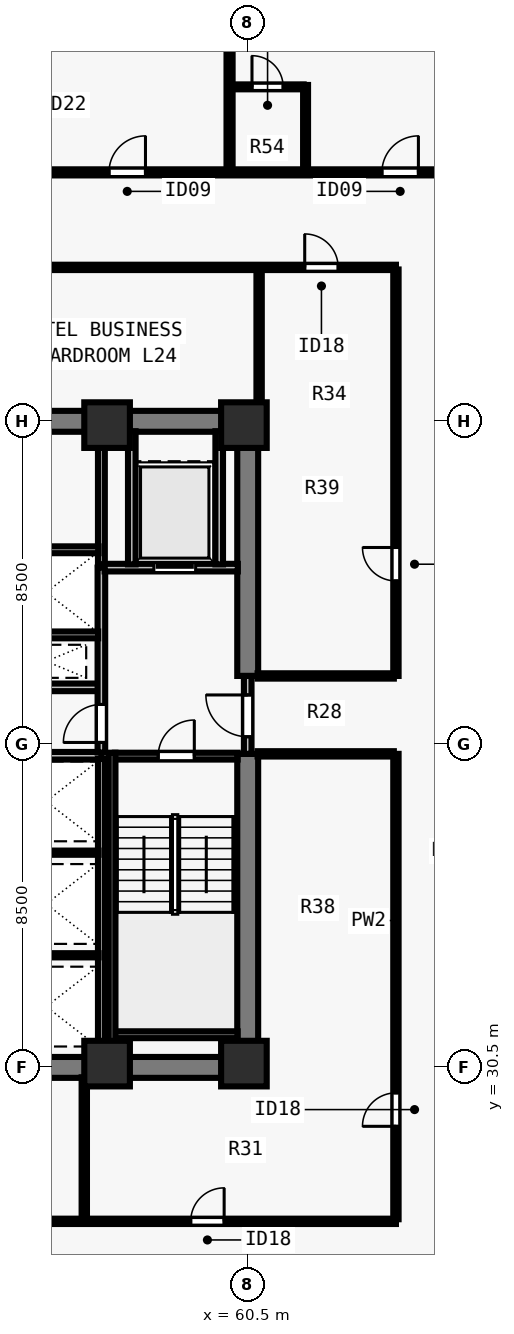
"""IFC4 building model, lengths in metres.
Left out: names, types, materials, properties, quantities, classifications, styles, units other than length and angle.
Written with IfcOpenShell. Run it as: python <this file> out.ifc"""

import sys

from ifc_helpers import new_model, si_unit, direction, frame, frame_2d, origin, origin_2d, place, context, subcontext, project, spatial, rectangle, extrude, element, fill, save


model = new_model("IFC4")
c1 = context("Model", 3, precision=1e-05, world=origin(), true_north=direction((0.0, 1.0)))
c2 = subcontext(c1, "Body", "Model", "MODEL_VIEW")
j1 = project(units=[si_unit("LENGTHUNIT", "METRE"), si_unit("PLANEANGLEUNIT", "RADIAN")], contexts=[c1])
p1 = place(None, origin())
s1 = spatial("IfcSite", under=j1, at=p1, CompositionType="ELEMENT")
p2 = place(p1, origin())
s2 = spatial("IfcBuilding", under=s1, at=p2, CompositionType="ELEMENT")
p3 = place(p2, frame((0.0, 0.0, 90.0)))
s3 = spatial("IfcBuildingStorey", under=s2, at=p3, CompositionType="ELEMENT", Elevation=90.0)
for number, where, z_axis, x_axis in (
    (1, (56.8, 30.6, 0.0), (0.0, 0.0, 1.0), (1.0, 0.0, 0.0)),
    (2, (60.4, 30.6, 0.0), (0.0, 0.0, 1.0), (1.0, 0.0, 0.0)),
    (3, (56.8, 47.4, 0.0), (0.0, 0.0, 1.0), (1.0, 0.0, 0.0)),
    (4, (60.4, 47.4, 0.0), (0.0, 0.0, 1.0), (1.0, 0.0, 0.0)),
):
    element("IfcColumn", number, at=place(p3, frame(where, z_axis=z_axis, x_axis=x_axis)), inside=s3, PredefinedType="COLUMN", context=c2, shape_type="SweptSolid", body=[
        extrude(rectangle(XDim=1.2, YDim=1.2, at=origin_2d()), origin(), (0.0, 0.0, 1.0), 3.5),
    ])
for number, where, z_axis, x_axis in (
    (5, (43.225, 30.5, 0.0), (0.0, 0.0, 1.0), (1.0, 0.0, 0.0)),
    (6, (43.225, 47.5, 0.0), (0.0, 0.0, 1.0), (1.0, 0.0, 0.0)),
):
    element("IfcWall", number, at=place(p3, frame(where, z_axis=z_axis, x_axis=x_axis)), inside=s3, PredefinedType="SHEAR", context=c2, shape_type="SweptSolid", body=[
        extrude(rectangle(XDim=17.55, YDim=0.55, at=frame_2d((8.775, 0.0))), origin(), (0.0, 0.0, 1.0), 3.28),
    ])
p4 = place(p3, frame((60.5, 30.765, 0.0), z_axis=(0.0, 0.0, 1.0), x_axis=(0.0, 1.0, 0.0)))
e7 = element("IfcWall", 7, at=p4, inside=s3, PredefinedType="SHEAR", context=c2, shape_type="SweptSolid", body=[
    extrude(rectangle(XDim=7.985, YDim=0.55, at=frame_2d((3.993, 0.0))), origin(), (0.0, 0.0, 1.0), 3.28),
])
p5 = place(p3, frame((60.5, 40.8, 0.0), z_axis=(0.0, 0.0, 1.0), x_axis=(0.0, 1.0, 0.0)))
e8 = element("IfcWall", 8, at=p5, inside=s3, PredefinedType="SHEAR", context=c2, shape_type="SweptSolid", body=[
    extrude(rectangle(XDim=6.435, YDim=0.55, at=frame_2d((3.218, 0.0))), origin(), (0.0, 0.0, 1.0), 3.28),
])
for number, where, z_axis, x_axis in (
    (9, (53.7, 38.7, 0.0), (0.0, 0.0, 1.0), (1.0, 0.0, 0.0)),
    (10, (53.7, 40.5, 0.0), (0.0, 0.0, 1.0), (1.0, 0.0, 0.0)),
):
    element("IfcWall", number, at=place(p3, frame(where, z_axis=z_axis, x_axis=x_axis)), inside=s3, PredefinedType="SOLIDWALL", context=c2, shape_type="SweptSolid", body=[
        extrude(rectangle(XDim=2.95, YDim=0.2, at=frame_2d((1.475, 0.0))), origin(), (0.0, 0.0, 1.0), 3.28),
    ])
p6 = place(p3, frame((60.5, 38.75, 0.0), z_axis=(0.0, 0.0, 1.0), x_axis=(0.0, 1.0, 0.0)))
e11 = element("IfcWall", 11, at=p6, inside=s3, PredefinedType="SOLIDWALL", context=c2, shape_type="SweptSolid", body=[
    extrude(rectangle(XDim=2.05, YDim=0.2, at=frame_2d((1.025, 0.0))), origin(), (0.0, 0.0, 1.0), 3.28),
])
p7 = place(p6, frame((0.45, 0.0, 0.0)))
e12 = element("IfcOpeningElement", 12, at=p7, cuts=e11, PredefinedType="OPENING", context=c2, shape_type="SweptSolid", body=[
    extrude(rectangle(XDim=1.1, YDim=2.15, at=frame_2d((0.55, 1.075))), frame((0.0, 0.11, 0.0), z_axis=(0.0, -1.0, 0.0), x_axis=(1.0, 0.0, 0.0)), (0.0, 0.0, 1.0), 0.22),
])
p8 = place(p3, frame((56.65, 38.785, 0.0), z_axis=(0.0, 0.0, 1.0), x_axis=(0.0, 1.0, 0.0)))
e13 = element("IfcWall", 13, at=p8, inside=s3, PredefinedType="SOLIDWALL", context=c2, shape_type="SweptSolid", body=[
    extrude(rectangle(XDim=4.865, YDim=0.2, at=frame_2d((2.433, 0.0))), origin(), (0.0, 0.0, 1.0), 3.28),
])
p9 = place(p8, frame((0.265, 0.0, 0.0)))
e14 = element("IfcOpeningElement", 14, at=p9, cuts=e13, PredefinedType="OPENING", context=c2, shape_type="SweptSolid", body=[
    extrude(rectangle(XDim=1.0, YDim=2.15, at=frame_2d((0.5, 1.075))), frame((0.0, 0.11, 0.0), z_axis=(0.0, -1.0, 0.0), x_axis=(1.0, 0.0, 0.0)), (0.0, 0.0, 1.0), 0.22),
])
p10 = place(p3, frame((56.735, 43.65, 0.0), z_axis=(0.0, 0.0, 1.0), x_axis=(1.0, 0.0, 0.0)))
e15 = element("IfcWall", 15, at=p10, inside=s3, PredefinedType="SOLIDWALL", context=c2, shape_type="SweptSolid", body=[
    extrude(rectangle(XDim=3.505, YDim=0.2, at=frame_2d((1.752, 0.0))), origin(), (0.0, 0.0, 1.0), 3.28),
])
p11 = place(p10, frame((1.295, 0.0, 0.0)))
e16 = element("IfcOpeningElement", 16, at=p11, cuts=e15, PredefinedType="OPENING", context=c2, shape_type="SweptSolid", body=[
    extrude(rectangle(XDim=1.1, YDim=2.2, at=frame_2d((0.55, 1.1))), frame((0.0, 0.11, 0.0), z_axis=(0.0, -1.0, 0.0), x_axis=(1.0, 0.0, 0.0)), (0.0, 0.0, 1.0), 0.22),
])
for number, where, z_axis, x_axis in (
    (17, (57.45, 43.735, 0.0), (0.0, 0.0, 1.0), (0.0, 1.0, 0.0)),
    (18, (59.75, 43.735, 0.0), (0.0, 0.0, 1.0), (0.0, 1.0, 0.0)),
):
    element("IfcWall", number, at=place(p3, frame(where, z_axis=z_axis, x_axis=x_axis)), inside=s3, PredefinedType="SOLIDWALL", context=c2, shape_type="SweptSolid", body=[
        extrude(rectangle(XDim=3.505, YDim=0.2, at=frame_2d((1.752, 0.0))), origin(), (0.0, 0.0, 1.0), 3.28),
    ])
p12 = place(p3, frame((56.65, 30.76, 0.0), z_axis=(0.0, 0.0, 1.0), x_axis=(0.0, 1.0, 0.0)))
e19 = element("IfcWall", 19, at=p12, inside=s3, PredefinedType="SOLIDWALL", context=c2, shape_type="SweptSolid", body=[
    extrude(rectangle(XDim=7.855, YDim=0.18, at=frame_2d((3.927, 0.0))), origin(), (0.0, 0.0, 1.0), 3.28),
])
for number, where, z_axis, x_axis in (
    (20, (53.785, 33.45, 0.0), (0.0, 0.0, 1.0), (1.0, 0.0, 0.0)),
    (21, (53.785, 36.15, 0.0), (0.0, 0.0, 1.0), (1.0, 0.0, 0.0)),
):
    element("IfcWall", number, at=place(p3, frame(where, z_axis=z_axis, x_axis=x_axis)), inside=s3, PredefinedType="PARTITIONING", context=c2, shape_type="SweptSolid", body=[
        extrude(rectangle(XDim=2.79, YDim=0.11, at=frame_2d((1.395, 0.0))), origin(), (0.0, 0.0, 1.0), 3.28),
    ])
p13 = place(p3, frame((56.65, 43.735, 0.0), z_axis=(0.0, 0.0, 1.0), x_axis=(0.0, 1.0, 0.0)))
e22 = element("IfcWall", 22, at=p13, inside=s3, PredefinedType="SOLIDWALL", context=c2, shape_type="SweptSolid", body=[
    extrude(rectangle(XDim=3.505, YDim=0.18, at=frame_2d((1.752, 0.0))), origin(), (0.0, 0.0, 1.0), 3.28),
])
p14 = place(p3, frame((53.785, 41.88, 0.0), z_axis=(0.0, 0.0, 1.0), x_axis=(1.0, 0.0, 0.0)))
e23 = element("IfcWall", 23, at=p14, inside=s3, PredefinedType="SOLIDWALL", context=c2, shape_type="SweptSolid", body=[
    extrude(rectangle(XDim=2.78, YDim=0.18, at=frame_2d((1.39, 0.0))), origin(), (0.0, 0.0, 1.0), 3.28),
])
p15 = place(p3, frame((53.785, 44.12, 0.0), z_axis=(0.0, 0.0, 1.0), x_axis=(1.0, 0.0, 0.0)))
e24 = element("IfcWall", 24, at=p15, inside=s3, PredefinedType="SOLIDWALL", context=c2, shape_type="SweptSolid", body=[
    extrude(rectangle(XDim=2.79, YDim=0.18, at=frame_2d((1.395, 0.0))), origin(), (0.0, 0.0, 1.0), 3.28),
])
p16 = place(p3, frame((37.1, 54.05, 0.0), z_axis=(0.0, 0.0, 1.0), x_axis=(1.0, 0.0, 0.0)))
e25 = element("IfcWall", 25, at=p16, inside=s3, PredefinedType="PARTITIONING", context=c2, shape_type="SweptSolid", body=[
    extrude(rectangle(XDim=29.8, YDim=0.16, at=frame_2d((14.9, 0.0))), origin(), (0.0, 0.0, 1.0), 3.28),
])
p17 = place(p16, frame((0.91, 0.0, 0.0)))
e26 = element("IfcOpeningElement", 26, at=p17, cuts=e25, PredefinedType="OPENING", context=c2, shape_type="SweptSolid", body=[
    extrude(rectangle(XDim=0.96, YDim=2.15, at=frame_2d((0.48, 1.075))), frame((0.0, 0.09, 0.0), z_axis=(0.0, -1.0, 0.0), x_axis=(1.0, 0.0, 0.0)), (0.0, 0.0, 1.0), 0.18),
])
p18 = place(p16, frame((3.03, 0.0, 0.0)))
e27 = element("IfcOpeningElement", 27, at=p18, cuts=e25, PredefinedType="OPENING", context=c2, shape_type="SweptSolid", body=[
    extrude(rectangle(XDim=0.96, YDim=2.15, at=frame_2d((0.48, 1.075))), frame((0.0, 0.09, 0.0), z_axis=(0.0, -1.0, 0.0), x_axis=(1.0, 0.0, 0.0)), (0.0, 0.0, 1.0), 0.18),
])
p19 = place(p16, frame((11.39, 0.0, 0.0)))
e28 = element("IfcOpeningElement", 28, at=p19, cuts=e25, PredefinedType="OPENING", context=c2, shape_type="SweptSolid", body=[
    extrude(rectangle(XDim=0.96, YDim=2.15, at=frame_2d((0.48, 1.075))), frame((0.0, 0.09, 0.0), z_axis=(0.0, -1.0, 0.0), x_axis=(1.0, 0.0, 0.0)), (0.0, 0.0, 1.0), 0.18),
])
p20 = place(p16, frame((19.75, 0.0, 0.0)))
e29 = element("IfcOpeningElement", 29, at=p20, cuts=e25, PredefinedType="OPENING", context=c2, shape_type="SweptSolid", body=[
    extrude(rectangle(XDim=0.96, YDim=2.15, at=frame_2d((0.48, 1.075))), frame((0.0, 0.09, 0.0), z_axis=(0.0, -1.0, 0.0), x_axis=(1.0, 0.0, 0.0)), (0.0, 0.0, 1.0), 0.18),
])
p21 = place(p16, frame((26.931, 0.0, 0.0)))
e30 = element("IfcOpeningElement", 30, at=p21, cuts=e25, PredefinedType="OPENING", context=c2, shape_type="SweptSolid", body=[
    extrude(rectangle(XDim=0.96, YDim=2.15, at=frame_2d((0.48, 1.075))), frame((0.0, 0.09, 0.0), z_axis=(0.0, -1.0, 0.0), x_axis=(1.0, 0.0, 0.0)), (0.0, 0.0, 1.0), 0.18),
])
p22 = place(p16, frame((28.48, 0.0, 0.0)))
e31 = element("IfcOpeningElement", 31, at=p22, cuts=e25, PredefinedType="OPENING", context=c2, shape_type="SweptSolid", body=[
    extrude(rectangle(XDim=0.96, YDim=2.15, at=frame_2d((0.48, 1.075))), frame((0.0, 0.09, 0.0), z_axis=(0.0, -1.0, 0.0), x_axis=(1.0, 0.0, 0.0)), (0.0, 0.0, 1.0), 0.18),
])
p23 = place(p3, frame((39.6, 26.45, 0.0), z_axis=(0.0, 0.0, 1.0), x_axis=(1.0, 0.0, 0.0)))
e32 = element("IfcWall", 32, at=p23, inside=s3, PredefinedType="PARTITIONING", context=c2, shape_type="SweptSolid", body=[
    extrude(rectangle(XDim=24.8, YDim=0.14, at=frame_2d((12.4, 0.0))), origin(), (0.0, 0.0, 1.0), 3.28),
])
p24 = place(p23, frame((1.2, 0.0, 0.0)))
e33 = element("IfcOpeningElement", 33, at=p24, cuts=e32, PredefinedType="OPENING", context=c2, shape_type="SweptSolid", body=[
    extrude(rectangle(XDim=0.88, YDim=2.1, at=frame_2d((0.44, 1.05))), frame((0.0, 0.08, 0.0), z_axis=(0.0, -1.0, 0.0), x_axis=(1.0, 0.0, 0.0)), (0.0, 0.0, 1.0), 0.16),
])
p25 = place(p23, frame((8.9, 0.0, 0.0)))
e34 = element("IfcOpeningElement", 34, at=p25, cuts=e32, PredefinedType="OPENING", context=c2, shape_type="SweptSolid", body=[
    extrude(rectangle(XDim=0.88, YDim=2.1, at=frame_2d((0.44, 1.05))), frame((0.0, 0.08, 0.0), z_axis=(0.0, -1.0, 0.0), x_axis=(1.0, 0.0, 0.0)), (0.0, 0.0, 1.0), 0.16),
])
p26 = place(p23, frame((19.4, 0.0, 0.0)))
e35 = element("IfcOpeningElement", 35, at=p26, cuts=e32, PredefinedType="OPENING", context=c2, shape_type="SweptSolid", body=[
    extrude(rectangle(XDim=0.88, YDim=2.1, at=frame_2d((0.44, 1.05))), frame((0.0, 0.08, 0.0), z_axis=(0.0, -1.0, 0.0), x_axis=(1.0, 0.0, 0.0)), (0.0, 0.0, 1.0), 0.16),
])
p27 = place(p3, frame((39.6, 51.55, 0.0), z_axis=(0.0, 0.0, 1.0), x_axis=(1.0, 0.0, 0.0)))
e36 = element("IfcWall", 36, at=p27, inside=s3, PredefinedType="PARTITIONING", context=c2, shape_type="SweptSolid", body=[
    extrude(rectangle(XDim=24.8, YDim=0.14, at=frame_2d((12.4, 0.0))), origin(), (0.0, 0.0, 1.0), 3.28),
])
p28 = place(p27, frame((2.2, 0.0, 0.0)))
e37 = element("IfcOpeningElement", 37, at=p28, cuts=e36, PredefinedType="OPENING", context=c2, shape_type="SweptSolid", body=[
    extrude(rectangle(XDim=0.88, YDim=2.1, at=frame_2d((0.44, 1.05))), frame((0.0, 0.08, 0.0), z_axis=(0.0, -1.0, 0.0), x_axis=(1.0, 0.0, 0.0)), (0.0, 0.0, 1.0), 0.16),
])
p29 = place(p27, frame((12.9, 0.0, 0.0)))
e38 = element("IfcOpeningElement", 38, at=p29, cuts=e36, PredefinedType="OPENING", context=c2, shape_type="SweptSolid", body=[
    extrude(rectangle(XDim=0.88, YDim=2.1, at=frame_2d((0.44, 1.05))), frame((0.0, 0.08, 0.0), z_axis=(0.0, -1.0, 0.0), x_axis=(1.0, 0.0, 0.0)), (0.0, 0.0, 1.0), 0.16),
])
p30 = place(p27, frame((22.4, 0.0, 0.0)))
e39 = element("IfcOpeningElement", 39, at=p30, cuts=e36, PredefinedType="OPENING", context=c2, shape_type="SweptSolid", body=[
    extrude(rectangle(XDim=0.88, YDim=2.1, at=frame_2d((0.44, 1.05))), frame((0.0, 0.08, 0.0), z_axis=(0.0, -1.0, 0.0), x_axis=(1.0, 0.0, 0.0)), (0.0, 0.0, 1.0), 0.16),
])
p31 = place(p3, frame((64.4, 26.505, 0.0), z_axis=(0.0, 0.0, 1.0), x_axis=(0.0, 1.0, 0.0)))
e40 = element("IfcWall", 40, at=p31, inside=s3, PredefinedType="PARTITIONING", context=c2, shape_type="SweptSolid", body=[
    extrude(rectangle(XDim=12.245, YDim=0.14, at=frame_2d((6.123, 0.0))), origin(), (0.0, 0.0, 1.0), 3.28),
])
p32 = place(p31, frame((2.445, 0.0, 0.0)))
e41 = element("IfcOpeningElement", 41, at=p32, cuts=e40, PredefinedType="OPENING", context=c2, shape_type="SweptSolid", body=[
    extrude(rectangle(XDim=0.88, YDim=2.1, at=frame_2d((0.44, 1.05))), frame((0.0, 0.08, 0.0), z_axis=(0.0, -1.0, 0.0), x_axis=(1.0, 0.0, 0.0)), (0.0, 0.0, 1.0), 0.16),
])
p33 = place(p3, frame((64.4, 40.8, 0.0), z_axis=(0.0, 0.0, 1.0), x_axis=(0.0, 1.0, 0.0)))
e42 = element("IfcWall", 42, at=p33, inside=s3, PredefinedType="PARTITIONING", context=c2, shape_type="SweptSolid", body=[
    extrude(rectangle(XDim=10.695, YDim=0.14, at=frame_2d((5.348, 0.0))), origin(), (0.0, 0.0, 1.0), 3.28),
])
p34 = place(p33, frame((2.5, 0.0, 0.0)))
e43 = element("IfcOpeningElement", 43, at=p34, cuts=e42, PredefinedType="OPENING", context=c2, shape_type="SweptSolid", body=[
    extrude(rectangle(XDim=0.88, YDim=2.1, at=frame_2d((0.44, 1.05))), frame((0.0, 0.08, 0.0), z_axis=(0.0, -1.0, 0.0), x_axis=(1.0, 0.0, 0.0)), (0.0, 0.0, 1.0), 0.16),
])
for number, where, z_axis, x_axis in (
    (44, (60.76, 38.75, 0.0), (0.0, 0.0, 1.0), (1.0, 0.0, 0.0)),
    (45, (60.76, 40.8, 0.0), (0.0, 0.0, 1.0), (1.0, 0.0, 0.0)),
):
    element("IfcWall", number, at=place(p3, frame(where, z_axis=z_axis, x_axis=x_axis)), inside=s3, PredefinedType="PARTITIONING", context=c2, shape_type="SweptSolid", body=[
        extrude(rectangle(XDim=3.585, YDim=0.14, at=frame_2d((1.792, 0.0))), origin(), (0.0, 0.0, 1.0), 3.28),
    ])
p35 = place(p3, frame((56.2, 26.505, 0.0), z_axis=(0.0, 0.0, 1.0), x_axis=(0.0, 1.0, 0.0)))
e46 = element("IfcWall", 46, at=p35, inside=s3, PredefinedType="PARTITIONING", context=c2, shape_type="SweptSolid", body=[
    extrude(rectangle(XDim=3.735, YDim=0.14, at=frame_2d((1.868, 0.0))), origin(), (0.0, 0.0, 1.0), 2.849),
])
p36 = place(p3, frame((60.8, 47.76, 0.0), z_axis=(0.0, 0.0, 1.0), x_axis=(0.0, 1.0, 0.0)))
e47 = element("IfcWall", 47, at=p36, inside=s3, PredefinedType="PARTITIONING", context=c2, shape_type="SweptSolid", body=[
    extrude(rectangle(XDim=3.735, YDim=0.14, at=frame_2d((1.868, 0.0))), origin(), (0.0, 0.0, 1.0), 2.439),
])
p37 = place(p3, frame((60.022, 54.115, 0.0), z_axis=(0.0, 0.0, 1.0), x_axis=(0.0, 1.0, 0.0)))
e48 = element("IfcWall", 48, at=p37, inside=s3, PredefinedType="PARTITIONING", context=c2, shape_type="SweptSolid", body=[
    extrude(rectangle(XDim=10.115, YDim=0.16, at=frame_2d((5.058, 0.0))), origin(), (0.0, 0.0, 1.0), 3.28),
])
p38 = place(p3, frame((62.022, 54.115, 0.0), z_axis=(0.0, 0.0, 1.0), x_axis=(0.0, 1.0, 0.0)))
e49 = element("IfcWall", 49, at=p38, inside=s3, PredefinedType="PLUMBINGWALL", context=c2, shape_type="SweptSolid", body=[
    extrude(rectangle(XDim=2.235, YDim=0.13, at=frame_2d((1.118, 0.0))), origin(), (0.0, 0.0, 1.0), 3.28),
])
p39 = place(p3, frame((60.087, 56.3, 0.0), z_axis=(0.0, 0.0, 1.0), x_axis=(1.0, 0.0, 0.0)))
e50 = element("IfcWall", 50, at=p39, inside=s3, PredefinedType="PLUMBINGWALL", context=c2, shape_type="SweptSolid", body=[
    extrude(rectangle(XDim=1.885, YDim=0.13, at=frame_2d((0.942, 0.0))), origin(), (0.0, 0.0, 1.0), 3.28),
])
p40 = place(p39, frame((0.525, 0.0, 0.0)))
e51 = element("IfcOpeningElement", 51, at=p40, cuts=e50, PredefinedType="OPENING", context=c2, shape_type="SweptSolid", body=[
    extrude(rectangle(XDim=0.82, YDim=2.1, at=frame_2d((0.41, 1.05))), frame((0.0, 0.075, 0.0), z_axis=(0.0, -1.0, 0.0), x_axis=(1.0, 0.0, 0.0)), (0.0, 0.0, 1.0), 0.15),
])
p41 = place(p3, frame((57.005, 38.69, 0.0), z_axis=(0.0, 0.0, 1.0), x_axis=(1.0, 0.0, 0.0)))
e52 = element("IfcWall", 52, at=p41, inside=s3, PredefinedType="SOLIDWALL", context=c2, shape_type="SweptSolid", body=[
    extrude(rectangle(XDim=3.23, YDim=0.18, at=frame_2d((1.615, 0.0))), origin(), (0.0, 0.0, 1.0), 3.28),
])
p42 = place(p41, frame((1.14, 0.0, 0.0)))
e53 = element("IfcOpeningElement", 53, at=p42, cuts=e52, PredefinedType="OPENING", context=c2, shape_type="SweptSolid", body=[
    extrude(rectangle(XDim=0.95, YDim=2.15, at=frame_2d((0.475, 1.075))), frame((0.0, 0.1, 0.0), z_axis=(0.0, -1.0, 0.0), x_axis=(1.0, 0.0, 0.0)), (0.0, 0.0, 1.0), 0.2),
])
p43 = place(p3, frame((57.005, 31.36, 0.0), z_axis=(0.0, 0.0, 1.0), x_axis=(1.0, 0.0, 0.0)))
e54 = element("IfcWall", 54, at=p43, inside=s3, PredefinedType="SOLIDWALL", context=c2, shape_type="SweptSolid", body=[
    extrude(rectangle(XDim=3.23, YDim=0.18, at=frame_2d((1.615, 0.0))), origin(), (0.0, 0.0, 1.0), 3.28),
])
p44 = place(p3, frame((56.93, 38.78, 0.0), z_axis=(0.0, 0.0, 1.0), x_axis=(0.0, -1.0, 0.0)))
e55 = element("IfcWall", 55, at=p44, inside=s3, PredefinedType="SOLIDWALL", context=c2, shape_type="SweptSolid", body=[
    extrude(rectangle(XDim=8.017, YDim=0.18, at=frame_2d((4.009, 0.0))), origin(), (0.0, 0.0, 1.0), 3.28),
])
p45 = place(p7, origin())
e56 = element("IfcDoor", 56, at=p45, inside=s3, OperationType="SINGLE_SWING_RIGHT", PredefinedType="DOOR", context=c2, shape_type="SweptSolid", body=[
    extrude(rectangle(XDim=1.1, YDim=2.15, at=frame_2d((0.55, 1.075))), frame((0.0, 0.025, 0.0), z_axis=(0.0, -1.0, 0.0), x_axis=(1.0, 0.0, 0.0)), (0.0, 0.0, 1.0), 0.05),
])
fill(e12, e56)
p46 = place(p9, origin())
e57 = element("IfcDoor", 57, at=p46, inside=s3, OperationType="SINGLE_SWING_LEFT", PredefinedType="DOOR", context=c2, shape_type="SweptSolid", body=[
    extrude(rectangle(XDim=1.0, YDim=2.15, at=frame_2d((0.5, 1.075))), frame((0.0, 0.025, 0.0), z_axis=(0.0, -1.0, 0.0), x_axis=(1.0, 0.0, 0.0)), (0.0, 0.0, 1.0), 0.05),
])
fill(e14, e57)
p47 = place(p11, origin())
e58 = element("IfcDoor", 58, at=p47, inside=s3, OperationType="SLIDING_TO_LEFT", PredefinedType="DOOR", context=c2, shape_type="SweptSolid", body=[
    extrude(rectangle(XDim=1.1, YDim=2.2, at=frame_2d((0.55, 1.1))), frame((0.0, 0.025, 0.0), z_axis=(0.0, -1.0, 0.0), x_axis=(1.0, 0.0, 0.0)), (0.0, 0.0, 1.0), 0.05),
])
fill(e16, e58)
p48 = place(p26, origin())
e59 = element("IfcDoor", 59, at=p48, inside=s3, OperationType="SINGLE_SWING_RIGHT", PredefinedType="DOOR", context=c2, shape_type="SweptSolid", body=[
    extrude(rectangle(XDim=0.88, YDim=2.1, at=frame_2d((0.44, 1.05))), frame((0.0, 0.025, 0.0), z_axis=(0.0, -1.0, 0.0), x_axis=(1.0, 0.0, 0.0)), (0.0, 0.0, 1.0), 0.05),
])
fill(e35, e59)
p49 = place(p30, origin())
e60 = element("IfcDoor", 60, at=p49, inside=s3, OperationType="SINGLE_SWING_LEFT", PredefinedType="DOOR", context=c2, shape_type="SweptSolid", body=[
    extrude(rectangle(XDim=0.88, YDim=2.1, at=frame_2d((0.44, 1.05))), frame((0.0, 0.025, 0.0), z_axis=(0.0, -1.0, 0.0), x_axis=(1.0, 0.0, 0.0)), (0.0, 0.0, 1.0), 0.05),
])
fill(e39, e60)
p50 = place(p32, origin())
e61 = element("IfcDoor", 61, at=p50, inside=s3, OperationType="SINGLE_SWING_LEFT", PredefinedType="DOOR", context=c2, shape_type="SweptSolid", body=[
    extrude(rectangle(XDim=0.88, YDim=2.1, at=frame_2d((0.44, 1.05))), frame((0.0, 0.025, 0.0), z_axis=(0.0, -1.0, 0.0), x_axis=(1.0, 0.0, 0.0)), (0.0, 0.0, 1.0), 0.05),
])
fill(e41, e61)
p51 = place(p34, origin())
e62 = element("IfcDoor", 62, at=p51, inside=s3, OperationType="SINGLE_SWING_RIGHT", PredefinedType="DOOR", context=c2, shape_type="SweptSolid", body=[
    extrude(rectangle(XDim=0.88, YDim=2.1, at=frame_2d((0.44, 1.05))), frame((0.0, 0.025, 0.0), z_axis=(0.0, -1.0, 0.0), x_axis=(1.0, 0.0, 0.0)), (0.0, 0.0, 1.0), 0.05),
])
fill(e43, e62)
p52 = place(p20, origin())
e63 = element("IfcDoor", 63, at=p52, inside=s3, OperationType="SINGLE_SWING_RIGHT", PredefinedType="DOOR", context=c2, shape_type="SweptSolid", body=[
    extrude(rectangle(XDim=0.96, YDim=2.15, at=frame_2d((0.48, 1.075))), frame((0.0, 0.025, 0.0), z_axis=(0.0, -1.0, 0.0), x_axis=(1.0, 0.0, 0.0)), (0.0, 0.0, 1.0), 0.05),
])
fill(e29, e63)
p53 = place(p40, origin())
e64 = element("IfcDoor", 64, at=p53, inside=s3, OperationType="SINGLE_SWING_LEFT", PredefinedType="DOOR", context=c2, shape_type="SweptSolid", body=[
    extrude(rectangle(XDim=0.82, YDim=2.1, at=frame_2d((0.41, 1.05))), frame((0.0, 0.025, 0.0), z_axis=(0.0, -1.0, 0.0), x_axis=(1.0, 0.0, 0.0)), (0.0, 0.0, 1.0), 0.05),
])
fill(e51, e64)
p54 = place(p21, origin())
e65 = element("IfcDoor", 65, at=p54, inside=s3, OperationType="SINGLE_SWING_RIGHT", PredefinedType="DOOR", context=c2, shape_type="SweptSolid", body=[
    extrude(rectangle(XDim=0.96, YDim=2.15, at=frame_2d((0.48, 1.075))), frame((0.0, 0.025, 0.0), z_axis=(0.0, -1.0, 0.0), x_axis=(1.0, 0.0, 0.0)), (0.0, 0.0, 1.0), 0.05),
])
fill(e30, e65)
p55 = place(p42, origin())
e66 = element("IfcDoor", 66, at=p55, inside=s3, OperationType="SINGLE_SWING_RIGHT", PredefinedType="DOOR", context=c2, shape_type="SweptSolid", body=[
    extrude(rectangle(XDim=0.95, YDim=2.15, at=frame_2d((0.475, 1.075))), frame((0.0, 0.025, 0.0), z_axis=(0.0, -1.0, 0.0), x_axis=(1.0, 0.0, 0.0)), (0.0, 0.0, 1.0), 0.05),
])
fill(e53, e66)
save(model, sys.argv[1])
